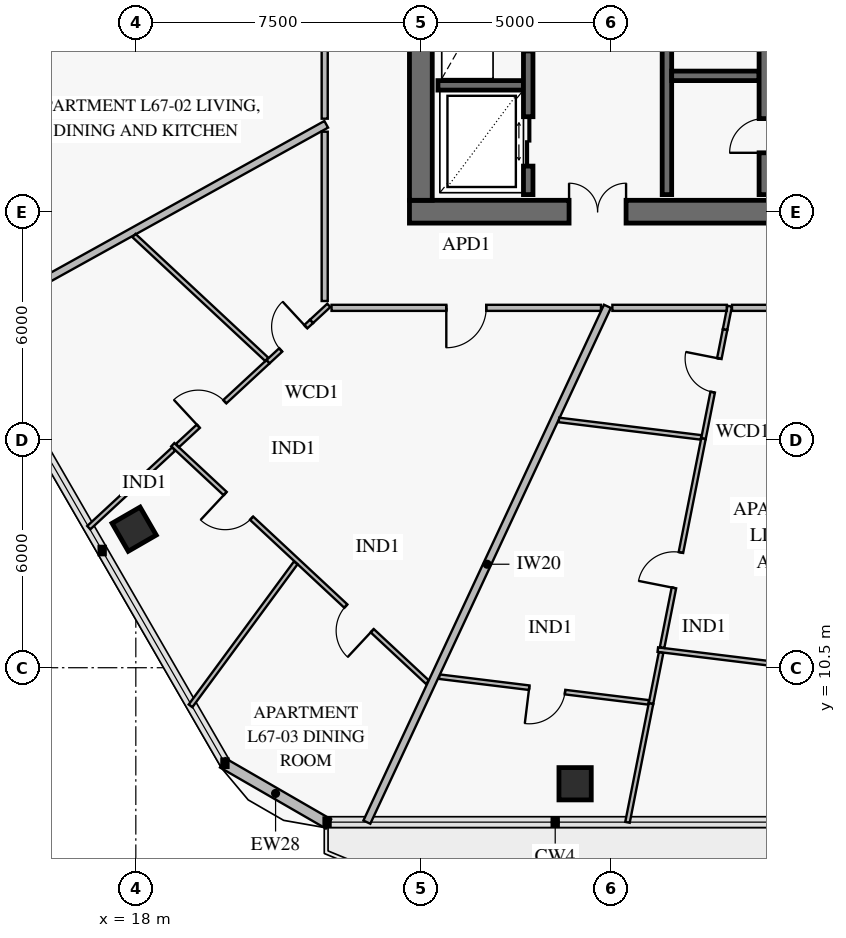
"""IFC4 building model, lengths in metres.
Left out: names, types, materials, properties, quantities, classifications, styles, units other than length and angle.
Written with IfcOpenShell. Run it as: python <this file> out.ifc"""

import sys

from ifc_helpers import new_model, si_unit, direction, frame, frame_2d, origin, origin_2d, place, context, subcontext, project, spatial, rectangle, extrude, element, fill, save


model = new_model("IFC4")
c1 = context("Model", 3, precision=1e-05, world=origin(), true_north=direction((0.0, 1.0)))
c2 = subcontext(c1, "Body", "Model", "MODEL_VIEW")
j1 = project(units=[si_unit("LENGTHUNIT", "METRE"), si_unit("PLANEANGLEUNIT", "RADIAN")], contexts=[c1])
p1 = place(None, origin())
s1 = spatial("IfcSite", under=j1, at=p1, CompositionType="ELEMENT")
p2 = place(p1, origin())
s2 = spatial("IfcBuilding", under=s1, at=p2, CompositionType="ELEMENT")
p3 = place(p2, frame((0.0, 0.0, 265.4)))
s3 = spatial("IfcBuildingStorey", under=s2, at=p3, CompositionType="ELEMENT", Elevation=265.4)
p4 = place(p3, frame((25.2, 22.5, 0.0), z_axis=(0.0, 0.0, 1.0), x_axis=(1.0, 0.0, 0.0)))
e1 = element("IfcWall", 1, at=p4, inside=s3, PredefinedType="SHEAR", context=c2, shape_type="SweptSolid", body=[
    extrude(rectangle(XDim=9.85, YDim=0.6, at=frame_2d((4.925, 0.0))), origin(), (0.0, 0.0, 1.0), 3.8),
])
p5 = place(p4, frame((4.2, 0.0, 0.0)))
e2 = element("IfcOpeningElement", 2, at=p5, cuts=e1, PredefinedType="OPENING", context=c2, shape_type="SweptSolid", body=[
    extrude(rectangle(XDim=1.5, YDim=2.15, at=frame_2d((0.75, 1.075))), frame((0.0, 0.312, 0.0), z_axis=(0.0, -1.0, 0.0), x_axis=(1.0, 0.0, 0.0)), (0.0, 0.0, 1.0), 0.624),
])
p6 = place(p3, frame((25.5, 22.8, 0.0), z_axis=(0.0, 0.0, 1.0), x_axis=(0.0, 1.0, 0.0)))
e3 = element("IfcWall", 3, at=p6, inside=s3, PredefinedType="SHEAR", context=c2, shape_type="SweptSolid", body=[
    extrude(rectangle(XDim=18.4, YDim=0.6, at=frame_2d((9.2, 0.0))), origin(), (0.0, 0.0, 1.0), 3.8),
])
p7 = place(p6, frame((8.95, 0.0, 0.0)))
e4 = element("IfcOpeningElement", 4, at=p7, cuts=e3, PredefinedType="OPENING", context=c2, shape_type="SweptSolid", body=[
    extrude(rectangle(XDim=1.1, YDim=2.15, at=frame_2d((0.55, 1.075))), frame((0.0, 0.312, 0.0), z_axis=(0.0, -1.0, 0.0), x_axis=(1.0, 0.0, 0.0)), (0.0, 0.0, 1.0), 0.624),
])
for number, where, z_axis, x_axis in (
    (5, (17.956, 14.145, 0.0), (0.0, 0.0, 1.0), (0.5, -0.866, 0.0)),
    (6, (29.559, 7.446, 0.0), (0.0, 0.0, 1.0), (1.0, 0.0, 0.0)),
):
    element("IfcColumn", number, at=place(p3, frame(where, z_axis=z_axis, x_axis=x_axis)), inside=s3, PredefinedType="COLUMN", context=c2, shape_type="SweptSolid", body=[
        extrude(rectangle(XDim=0.85, YDim=0.85, at=origin_2d()), origin(), (0.0, 0.0, 1.0), 3.55),
    ])
p8 = place(p3, frame((23.07, 6.389, 0.0), z_axis=(0.0, 0.0, 1.0), x_axis=(-0.866028773314, 0.499994163758, 0.0)))
e7 = element("IfcWall", 7, at=p8, inside=s3, PredefinedType="SOLIDWALL", context=c2, shape_type="SweptSolid", body=[
    extrude(rectangle(XDim=3.215, YDim=0.28, at=frame_2d((1.607, 0.0))), origin(), (0.0, 0.0, 1.0), 3.55),
])
p9 = place(p3, frame((25.95, 25.825, 0.0), z_axis=(0.0, 0.0, 1.0), x_axis=(1.0, 0.0, 0.0)))
e8 = element("IfcWall", 8, at=p9, inside=s3, PredefinedType="SOLIDWALL", context=c2, shape_type="SweptSolid", body=[
    extrude(rectangle(XDim=2.25, YDim=0.25, at=frame_2d((1.125, 0.0))), origin(), (0.0, 0.0, 1.0), 3.8),
])
p10 = place(p3, frame((28.325, 22.95, 0.0), z_axis=(0.0, 0.0, 1.0), x_axis=(0.0, 1.0, 0.0)))
e9 = element("IfcWall", 9, at=p10, inside=s3, PredefinedType="SOLIDWALL", context=c2, shape_type="SweptSolid", body=[
    extrude(rectangle(XDim=8.2, YDim=0.25, at=frame_2d((4.1, 0.0))), origin(), (0.0, 0.0, 1.0), 3.8),
])
p11 = place(p10, frame((0.75, 0.0, 0.0)))
e10 = element("IfcOpeningElement", 10, at=p11, cuts=e9, PredefinedType="OPENING", context=c2, shape_type="SweptSolid", body=[
    extrude(rectangle(XDim=1.3, YDim=2.3, at=frame_2d((0.65, 1.15))), frame((0.0, 0.137, 0.0), z_axis=(0.0, -1.0, 0.0), x_axis=(1.0, 0.0, 0.0)), (0.0, 0.0, 1.0), 0.274),
])
p12 = place(p10, frame((3.78, 0.0, 0.0)))
e11 = element("IfcOpeningElement", 11, at=p12, cuts=e9, PredefinedType="OPENING", context=c2, shape_type="SweptSolid", body=[
    extrude(rectangle(XDim=0.9, YDim=2.1, at=frame_2d((0.45, 1.05))), frame((0.0, 0.137, 0.0), z_axis=(0.0, -1.0, 0.0), x_axis=(1.0, 0.0, 0.0)), (0.0, 0.0, 1.0), 0.274),
])
p13 = place(p10, frame((6.5, 0.0, 0.0)))
e12 = element("IfcOpeningElement", 12, at=p13, cuts=e9, PredefinedType="OPENING", context=c2, shape_type="SweptSolid", body=[
    extrude(rectangle(XDim=0.9, YDim=2.1, at=frame_2d((0.45, 1.05))), frame((0.0, 0.137, 0.0), z_axis=(0.0, -1.0, 0.0), x_axis=(1.0, 0.0, 0.0)), (0.0, 0.0, 1.0), 0.274),
])
p14 = place(p3, frame((31.975, 22.95, 0.0), z_axis=(0.0, 0.0, 1.0), x_axis=(0.0, 1.0, 0.0)))
e13 = element("IfcWall", 13, at=p14, inside=s3, PredefinedType="SOLIDWALL", context=c2, shape_type="SweptSolid", body=[
    extrude(rectangle(XDim=8.2, YDim=0.25, at=frame_2d((4.1, 0.0))), origin(), (0.0, 0.0, 1.0), 3.8),
])
p15 = place(p3, frame((32.1, 26.075, 0.0), z_axis=(0.0, 0.0, 1.0), x_axis=(1.0, 0.0, 0.0)))
e14 = element("IfcWall", 14, at=p15, inside=s3, PredefinedType="SOLIDWALL", context=c2, shape_type="SweptSolid", body=[
    extrude(rectangle(XDim=2.3, YDim=0.25, at=frame_2d((1.15, 0.0))), origin(), (0.0, 0.0, 1.0), 3.8),
])
p16 = place(p3, frame((34.525, 22.95, 0.0), z_axis=(0.0, 0.0, 1.0), x_axis=(0.0, 1.0, 0.0)))
e15 = element("IfcWall", 15, at=p16, inside=s3, PredefinedType="SOLIDWALL", context=c2, shape_type="SweptSolid", body=[
    extrude(rectangle(XDim=8.2, YDim=0.25, at=frame_2d((4.1, 0.0))), origin(), (0.0, 0.0, 1.0), 3.8),
])
p17 = place(p16, frame((1.1, 0.0, 0.0)))
e16 = element("IfcOpeningElement", 16, at=p17, cuts=e15, PredefinedType="OPENING", context=c2, shape_type="SweptSolid", body=[
    extrude(rectangle(XDim=0.9, YDim=2.1, at=frame_2d((0.45, 1.05))), frame((0.0, 0.137, 0.0), z_axis=(0.0, -1.0, 0.0), x_axis=(1.0, 0.0, 0.0)), (0.0, 0.0, 1.0), 0.274),
])
p18 = place(p16, frame((5.2, 0.0, 0.0)))
e17 = element("IfcOpeningElement", 17, at=p18, cuts=e15, PredefinedType="OPENING", context=c2, shape_type="SweptSolid", body=[
    extrude(rectangle(XDim=0.9, YDim=2.1, at=frame_2d((0.45, 1.05))), frame((0.0, 0.137, 0.0), z_axis=(0.0, -1.0, 0.0), x_axis=(1.0, 0.0, 0.0)), (0.0, 0.0, 1.0), 0.274),
])
p19 = place(p3, frame((22.97, 30.426, 0.0), z_axis=(0.0, 0.0, 1.0), x_axis=(0.0, -1.0, 0.0)))
e18 = element("IfcWall", 18, at=p19, inside=s3, PredefinedType="PARTITIONING", context=c2, shape_type="SweptSolid", body=[
    extrude(rectangle(XDim=5.478, YDim=0.16, at=frame_2d((2.739, 0.0))), origin(), (0.0, 0.0, 1.0), 2.95),
])
p20 = place(p19, frame((2.214, 0.0, 0.0)))
e19 = element("IfcOpeningElement", 19, at=p20, cuts=e18, PredefinedType="OPENING", context=c2, shape_type="SweptSolid", body=[
    extrude(rectangle(XDim=1.05, YDim=2.15, at=frame_2d((0.525, 1.075))), frame((0.0, 0.092, 0.0), z_axis=(0.0, -1.0, 0.0), x_axis=(1.0, 0.0, 0.0)), (0.0, 0.0, 1.0), 0.184),
])
p21 = place(p3, frame((18.972, 16.368, 0.0), z_axis=(0.0, 0.0, 1.0), x_axis=(0.731359968951, -0.68199163911, 0.0)))
e20 = element("IfcWall", 20, at=p21, inside=s3, PredefinedType="PARTITIONING", context=c2, shape_type="SweptSolid", body=[
    extrude(rectangle(XDim=9.164, YDim=0.12, at=frame_2d((4.582, 0.0))), origin(), (0.0, 0.0, 1.0), 2.95),
])
p22 = place(p21, frame((1.885, 0.0, 0.0)))
e21 = element("IfcOpeningElement", 21, at=p22, cuts=e20, PredefinedType="OPENING", context=c2, shape_type="SweptSolid", body=[
    extrude(rectangle(XDim=0.95, YDim=2.1, at=frame_2d((0.475, 1.05))), frame((0.0, 0.072, 0.0), z_axis=(0.0, -1.0, 0.0), x_axis=(1.0, 0.0, 0.0)), (0.0, 0.0, 1.0), 0.144),
])
p23 = place(p21, frame((6.227, 0.0, 0.0)))
e22 = element("IfcOpeningElement", 22, at=p23, cuts=e20, PredefinedType="OPENING", context=c2, shape_type="SweptSolid", body=[
    extrude(rectangle(XDim=0.95, YDim=2.1, at=frame_2d((0.475, 1.05))), frame((0.0, 0.072, 0.0), z_axis=(0.0, -1.0, 0.0), x_axis=(1.0, 0.0, 0.0)), (0.0, 0.0, 1.0), 0.144),
])
p24 = place(p3, frame((22.625, 19.615, 0.0), z_axis=(0.0, 0.0, 1.0), x_axis=(-0.733731867306, -0.679439141424, 0.0)))
e23 = element("IfcWall", 23, at=p24, inside=s3, PredefinedType="PARTITIONING", context=c2, shape_type="SweptSolid", body=[
    extrude(rectangle(XDim=1.565, YDim=0.12, at=frame_2d((0.782, 0.0))), origin(), (0.0, 0.0, 1.0), 3.55),
])
p25 = place(p24, frame((0.207, 0.0, 0.0)))
e24 = element("IfcOpeningElement", 24, at=p25, cuts=e23, PredefinedType="OPENING", context=c2, shape_type="SweptSolid", body=[
    extrude(rectangle(XDim=0.9, YDim=2.1, at=frame_2d((0.45, 1.05))), frame((0.0, 0.072, 0.0), z_axis=(0.0, -1.0, 0.0), x_axis=(1.0, 0.0, 0.0)), (0.0, 0.0, 1.0), 0.144),
])
p26 = place(p3, frame((21.477, 18.552, 0.0), z_axis=(0.0, 0.0, 1.0), x_axis=(-0.733668997341, -0.679507028912, 0.0)))
e25 = element("IfcWall", 25, at=p26, inside=s3, PredefinedType="PARTITIONING", context=c2, shape_type="SweptSolid", body=[
    extrude(rectangle(XDim=3.245, YDim=0.12, at=frame_2d((1.623, 0.0))), origin(), (0.0, 0.0, 1.0), 3.15),
])
p27 = place(p26, frame((1.547, 0.0, 0.0)))
e26 = element("IfcOpeningElement", 26, at=p27, cuts=e25, PredefinedType="OPENING", context=c2, shape_type="SweptSolid", body=[
    extrude(rectangle(XDim=0.95, YDim=2.1, at=frame_2d((0.475, 1.05))), frame((0.0, 0.072, 0.0), z_axis=(0.0, -1.0, 0.0), x_axis=(1.0, 0.0, 0.0)), (0.0, 0.0, 1.0), 0.144),
])
p28 = place(p3, frame((18.996, 16.254, 0.0), z_axis=(0.0, 0.0, 1.0), x_axis=(-0.733732538896, -0.679438416168, 0.0)))
e27 = element("IfcWall", 27, at=p28, inside=s3, PredefinedType="PARTITIONING", context=c2, shape_type="SweptSolid", body=[
    extrude(rectangle(XDim=3.044, YDim=0.12, at=frame_2d((1.522, 0.0))), origin(), (0.0, 0.0, 1.0), 2.93),
])
p29 = place(p3, frame((23.15, 19.97, 0.0), z_axis=(0.0, 0.0, 1.0), x_axis=(1.0, 0.0, 0.0)))
e28 = element("IfcWall", 28, at=p29, inside=s3, PredefinedType="PARTITIONING", context=c2, shape_type="SweptSolid", body=[
    extrude(rectangle(XDim=7.09, YDim=0.16, at=frame_2d((3.545, 0.0))), origin(), (0.0, 0.0, 1.0), 2.95),
])
p30 = place(p29, frame((3.02, 0.0, 0.0)))
e29 = element("IfcOpeningElement", 29, at=p30, cuts=e28, PredefinedType="OPENING", context=c2, shape_type="SweptSolid", body=[
    extrude(rectangle(XDim=1.05, YDim=2.15, at=frame_2d((0.525, 1.075))), frame((0.0, 0.092, 0.0), z_axis=(0.0, -1.0, 0.0), x_axis=(1.0, 0.0, 0.0)), (0.0, 0.0, 1.0), 0.184),
])
p31 = place(p3, frame((31.735, 10.976, 0.0), z_axis=(0.0, 0.0, 1.0), x_axis=(0.992544489296, -0.121882881359, 0.0)))
e30 = element("IfcWall", 30, at=p31, inside=s3, PredefinedType="PARTITIONING", context=c2, shape_type="SweptSolid", body=[
    extrude(rectangle(XDim=8.519, YDim=0.12, at=frame_2d((4.26, 0.0))), origin(), (0.0, 0.0, 1.0), 3.55),
])
p32 = place(p31, frame((3.784, 0.0, 0.0)))
e31 = element("IfcOpeningElement", 31, at=p32, cuts=e30, PredefinedType="OPENING", context=c2, shape_type="SweptSolid", body=[
    extrude(rectangle(XDim=0.95, YDim=2.1, at=frame_2d((0.475, 1.05))), frame((0.0, 0.072, 0.0), z_axis=(0.0, -1.0, 0.0), x_axis=(1.0, 0.0, 0.0)), (0.0, 0.0, 1.0), 0.144),
])
p33 = place(p3, frame((33.505, 19.4, 0.0), z_axis=(0.0, 0.0, 1.0), x_axis=(-0.194223379767, -0.980957327692, 0.0)))
e32 = element("IfcWall", 32, at=p33, inside=s3, PredefinedType="PARTITIONING", context=c2, shape_type="SweptSolid", body=[
    extrude(rectangle(XDim=2.927, YDim=0.12, at=frame_2d((1.464, 0.0))), origin(), (0.0, 0.0, 1.0), 3.55),
])
p34 = place(p33, frame((0.78, 0.0, 0.0)))
e33 = element("IfcOpeningElement", 33, at=p34, cuts=e32, PredefinedType="OPENING", context=c2, shape_type="SweptSolid", body=[
    extrude(rectangle(XDim=0.9, YDim=2.1, at=frame_2d((0.45, 1.05))), frame((0.0, 0.072, 0.0), z_axis=(0.0, -1.0, 0.0), x_axis=(1.0, 0.0, 0.0)), (0.0, 0.0, 1.0), 0.144),
])
p35 = place(p3, frame((32.937, 16.528, 0.0), z_axis=(0.0, 0.0, 1.0), x_axis=(-0.194255896186, -0.980950889085, 0.0)))
e34 = element("IfcWall", 34, at=p35, inside=s3, PredefinedType="PARTITIONING", context=c2, shape_type="SweptSolid", body=[
    extrude(rectangle(XDim=5.604, YDim=0.12, at=frame_2d((2.802, 0.0))), origin(), (0.0, 0.0, 1.0), 3.15),
])
p36 = place(p35, frame((3.054, 0.0, 0.0)))
e35 = element("IfcOpeningElement", 35, at=p36, cuts=e34, PredefinedType="OPENING", context=c2, shape_type="SweptSolid", body=[
    extrude(rectangle(XDim=0.95, YDim=2.1, at=frame_2d((0.475, 1.05))), frame((0.0, 0.072, 0.0), z_axis=(0.0, -1.0, 0.0), x_axis=(1.0, 0.0, 0.0)), (0.0, 0.0, 1.0), 0.144),
])
p37 = place(p3, frame((31.822, 10.897, 0.0), z_axis=(0.0, 0.0, 1.0), x_axis=(-0.194227600247, -0.980956492054, 0.0)))
e36 = element("IfcWall", 36, at=p37, inside=s3, PredefinedType="PARTITIONING", context=c2, shape_type="SweptSolid", body=[
    extrude(rectangle(XDim=1.368, YDim=0.12, at=frame_2d((0.684, 0.0))), origin(), (0.0, 0.0, 1.0), 3.55),
])
p38 = place(p3, frame((25.985, 10.265, 0.0), z_axis=(0.0, 0.0, 1.0), x_axis=(0.992542241385, -0.121901185661, 0.0)))
e37 = element("IfcWall", 37, at=p38, inside=s3, PredefinedType="PARTITIONING", context=c2, shape_type="SweptSolid", body=[
    extrude(rectangle(XDim=5.55, YDim=0.12, at=frame_2d((2.775, 0.0))), origin(), (0.0, 0.0, 1.0), 2.95),
])
p39 = place(p38, frame((2.384, 0.0, 0.0)))
e38 = element("IfcOpeningElement", 38, at=p39, cuts=e37, PredefinedType="OPENING", context=c2, shape_type="SweptSolid", body=[
    extrude(rectangle(XDim=0.95, YDim=2.1, at=frame_2d((0.475, 1.05))), frame((0.0, 0.072, 0.0), z_axis=(0.0, -1.0, 0.0), x_axis=(1.0, 0.0, 0.0)), (0.0, 0.0, 1.0), 0.144),
])
p40 = place(p3, frame((23.01, 24.8, 0.0), z_axis=(0.0, 0.0, 1.0), x_axis=(-0.874612572959, -0.484822490426, 0.0)))
e39 = element("IfcWall", 39, at=p40, inside=s3, PredefinedType="PARTITIONING", context=c2, shape_type="SweptSolid", body=[
    extrude(rectangle(XDim=10.715, YDim=0.2, at=frame_2d((5.358, 0.0))), origin(), (0.0, 0.0, 1.0), 2.93),
])
p41 = place(p3, frame((22.208, 13.258, 0.0), z_axis=(0.0, 0.0, 1.0), x_axis=(-0.592681807332, -0.80543669848, 0.0)))
e40 = element("IfcWall", 40, at=p41, inside=s3, PredefinedType="PARTITIONING", context=c2, shape_type="SweptSolid", body=[
    extrude(rectangle(XDim=4.67, YDim=0.12, at=frame_2d((2.335, 0.0))), origin(), (0.0, 0.0, 1.0), 2.93),
])
p42 = place(p3, frame((23.079, 20.035, 0.0), z_axis=(0.0, 0.0, 1.0), x_axis=(-0.733833594252, -0.679329269167, 0.0)))
e41 = element("IfcWall", 41, at=p42, inside=s3, PredefinedType="PARTITIONING", context=c2, shape_type="SweptSolid", body=[
    extrude(rectangle(XDim=0.618, YDim=0.12, at=frame_2d((0.309, 0.0))), origin(), (0.0, 0.0, 1.0), 3.55),
])
p43 = place(p3, frame((17.952, 21.872, 0.0), z_axis=(0.0, 0.0, 1.0), x_axis=(0.731364558904, -0.681986716864, 0.0)))
e42 = element("IfcWall", 42, at=p43, inside=s3, PredefinedType="PARTITIONING", context=c2, shape_type="SweptSolid", body=[
    extrude(rectangle(XDim=4.776, YDim=0.12, at=frame_2d((2.388, 0.0))), origin(), (0.0, 0.0, 1.0), 3.15),
])
p44 = place(p3, frame((30.409, 20.01, 0.0), z_axis=(0.0, 0.0, 1.0), x_axis=(-0.422607909104, -0.906312614479, 0.0)))
e43 = element("IfcWall", 43, at=p44, inside=s3, PredefinedType="PARTITIONING", context=c2, shape_type="SweptSolid", body=[
    extrude(rectangle(XDim=14.977, YDim=0.2, at=frame_2d((7.488, 0.0))), origin(), (0.0, 0.0, 1.0), 2.93),
])
p45 = place(p3, frame((33.627, 20.014, 0.0), z_axis=(0.0, 0.0, 1.0), x_axis=(-0.194092051537, -0.98098332072, 0.0)))
e44 = element("IfcWall", 44, at=p45, inside=s3, PredefinedType="PARTITIONING", context=c2, shape_type="SweptSolid", body=[
    extrude(rectangle(XDim=0.626, YDim=0.12, at=frame_2d((0.313, 0.0))), origin(), (0.0, 0.0, 1.0), 3.55),
])
p46 = place(p3, frame((31.556, 9.555, 0.0), z_axis=(0.0, 0.0, 1.0), x_axis=(-0.19425823532, -0.980950425868, 0.0)))
e45 = element("IfcWall", 45, at=p46, inside=s3, PredefinedType="PARTITIONING", context=c2, shape_type="SweptSolid", body=[
    extrude(rectangle(XDim=3.185, YDim=0.12, at=frame_2d((1.592, 0.0))), origin(), (0.0, 0.0, 1.0), 2.93),
])
p47 = place(p3, frame((29.134, 17.02, 0.0), z_axis=(0.0, 0.0, 1.0), x_axis=(0.992545655443, -0.121873384548, 0.0)))
e46 = element("IfcWall", 46, at=p47, inside=s3, PredefinedType="PARTITIONING", context=c2, shape_type="SweptSolid", body=[
    extrude(rectangle(XDim=3.768, YDim=0.12, at=frame_2d((1.884, 0.0))), origin(), (0.0, 0.0, 1.0), 2.95),
])
p48 = place(p3, frame((22.97, 24.605, 0.0), z_axis=(0.0, 0.0, 1.0), x_axis=(0.0, -1.0, 0.0)))
e47 = element("IfcWall", 47, at=p48, inside=s3, PredefinedType="PARTITIONING", context=c2, shape_type="SweptSolid", body=[
    extrude(rectangle(XDim=4.455, YDim=0.16, at=frame_2d((2.228, 0.0))), origin(), (0.0, 0.0, 1.0), 3.55),
])
p49 = place(p3, frame((33.687, 19.97, 0.0), z_axis=(0.0, 0.0, 1.0), x_axis=(1.0, 0.0, 0.0)))
e48 = element("IfcWall", 48, at=p49, inside=s3, PredefinedType="PARTITIONING", context=c2, shape_type="SweptSolid", body=[
    extrude(rectangle(XDim=0.945, YDim=0.16, at=frame_2d((0.472, 0.0))), origin(), (0.0, 0.0, 1.0), 3.55),
])
p50 = place(p3, frame((30.54, 19.97, 0.0), z_axis=(0.0, 0.0, 1.0), x_axis=(1.0, 0.0, 0.0)))
e49 = element("IfcWall", 49, at=p50, inside=s3, PredefinedType="PARTITIONING", context=c2, shape_type="SweptSolid", body=[
    extrude(rectangle(XDim=3.009, YDim=0.16, at=frame_2d((1.504, 0.0))), origin(), (0.0, 0.0, 1.0), 2.95),
])
p51 = place(p5, origin())
e50 = element("IfcDoor", 50, at=p51, inside=s3, OperationType="DOUBLE_DOOR_SINGLE_SWING", PredefinedType="DOOR", context=c2, shape_type="SweptSolid", body=[
    extrude(rectangle(XDim=1.5, YDim=2.15, at=frame_2d((0.75, 1.075))), frame((0.0, 0.025, 0.0), z_axis=(0.0, -1.0, 0.0), x_axis=(1.0, 0.0, 0.0)), (0.0, 0.0, 1.0), 0.05),
])
fill(e2, e50)
p52 = place(p11, frame((1.3, 0.0, 0.0), z_axis=(0.0, 0.0, 1.0), x_axis=(-1.0, 0.0, 0.0)))
e51 = element("IfcDoor", 51, at=p52, inside=s3, OperationType="DOUBLE_DOOR_SLIDING", PredefinedType="DOOR", context=c2, shape_type="SweptSolid", body=[
    extrude(rectangle(XDim=1.3, YDim=2.3, at=frame_2d((0.65, 1.15))), frame((0.0, 0.025, 0.0), z_axis=(0.0, -1.0, 0.0), x_axis=(1.0, 0.0, 0.0)), (0.0, 0.0, 1.0), 0.05),
])
fill(e10, e51)
p53 = place(p17, origin())
e52 = element("IfcDoor", 52, at=p53, inside=s3, OperationType="SINGLE_SWING_LEFT", PredefinedType="DOOR", context=c2, shape_type="SweptSolid", body=[
    extrude(rectangle(XDim=0.9, YDim=2.1, at=frame_2d((0.45, 1.05))), frame((0.0, 0.025, 0.0), z_axis=(0.0, -1.0, 0.0), x_axis=(1.0, 0.0, 0.0)), (0.0, 0.0, 1.0), 0.05),
])
fill(e16, e52)
p54 = place(p22, frame((0.95, 0.0, 0.0), z_axis=(0.0, 0.0, 1.0), x_axis=(-1.0, 0.0, 0.0)))
e53 = element("IfcDoor", 53, at=p54, inside=s3, OperationType="SINGLE_SWING_RIGHT", PredefinedType="DOOR", context=c2, shape_type="SweptSolid", body=[
    extrude(rectangle(XDim=0.95, YDim=2.1, at=frame_2d((0.475, 1.05))), frame((0.0, 0.025, 0.0), z_axis=(0.0, -1.0, 0.0), x_axis=(1.0, 0.0, 0.0)), (0.0, 0.0, 1.0), 0.05),
])
fill(e21, e53)
p55 = place(p23, frame((0.95, 0.0, 0.0), z_axis=(0.0, 0.0, 1.0), x_axis=(-1.0, 0.0, 0.0)))
e54 = element("IfcDoor", 54, at=p55, inside=s3, OperationType="SINGLE_SWING_LEFT", PredefinedType="DOOR", context=c2, shape_type="SweptSolid", body=[
    extrude(rectangle(XDim=0.95, YDim=2.1, at=frame_2d((0.475, 1.05))), frame((0.0, 0.025, 0.0), z_axis=(0.0, -1.0, 0.0), x_axis=(1.0, 0.0, 0.0)), (0.0, 0.0, 1.0), 0.05),
])
fill(e22, e54)
p56 = place(p25, frame((0.9, 0.0, 0.0), z_axis=(0.0, 0.0, 1.0), x_axis=(-1.0, 0.0, 0.0)))
e55 = element("IfcDoor", 55, at=p56, inside=s3, OperationType="SINGLE_SWING_RIGHT", PredefinedType="DOOR", context=c2, shape_type="SweptSolid", body=[
    extrude(rectangle(XDim=0.9, YDim=2.1, at=frame_2d((0.45, 1.05))), frame((0.0, 0.025, 0.0), z_axis=(0.0, -1.0, 0.0), x_axis=(1.0, 0.0, 0.0)), (0.0, 0.0, 1.0), 0.05),
])
fill(e24, e55)
p57 = place(p27, frame((0.95, 0.0, 0.0), z_axis=(0.0, 0.0, 1.0), x_axis=(-1.0, 0.0, 0.0)))
e56 = element("IfcDoor", 56, at=p57, inside=s3, OperationType="SINGLE_SWING_LEFT", PredefinedType="DOOR", context=c2, shape_type="SweptSolid", body=[
    extrude(rectangle(XDim=0.95, YDim=2.1, at=frame_2d((0.475, 1.05))), frame((0.0, 0.025, 0.0), z_axis=(0.0, -1.0, 0.0), x_axis=(1.0, 0.0, 0.0)), (0.0, 0.0, 1.0), 0.05),
])
fill(e26, e56)
p58 = place(p30, frame((1.05, 0.0, 0.0), z_axis=(0.0, 0.0, 1.0), x_axis=(-1.0, 0.0, 0.0)))
e57 = element("IfcDoor", 57, at=p58, inside=s3, OperationType="SINGLE_SWING_RIGHT", PredefinedType="DOOR", context=c2, shape_type="SweptSolid", body=[
    extrude(rectangle(XDim=1.05, YDim=2.15, at=frame_2d((0.525, 1.075))), frame((0.0, 0.025, 0.0), z_axis=(0.0, -1.0, 0.0), x_axis=(1.0, 0.0, 0.0)), (0.0, 0.0, 1.0), 0.05),
])
fill(e29, e57)
p59 = place(p34, frame((0.9, 0.0, 0.0), z_axis=(0.0, 0.0, 1.0), x_axis=(-1.0, 0.0, 0.0)))
e58 = element("IfcDoor", 58, at=p59, inside=s3, OperationType="SINGLE_SWING_RIGHT", PredefinedType="DOOR", context=c2, shape_type="SweptSolid", body=[
    extrude(rectangle(XDim=0.9, YDim=2.1, at=frame_2d((0.45, 1.05))), frame((0.0, 0.025, 0.0), z_axis=(0.0, -1.0, 0.0), x_axis=(1.0, 0.0, 0.0)), (0.0, 0.0, 1.0), 0.05),
])
fill(e33, e58)
p60 = place(p36, frame((0.95, 0.0, 0.0), z_axis=(0.0, 0.0, 1.0), x_axis=(-1.0, 0.0, 0.0)))
e59 = element("IfcDoor", 59, at=p60, inside=s3, OperationType="SINGLE_SWING_LEFT", PredefinedType="DOOR", context=c2, shape_type="SweptSolid", body=[
    extrude(rectangle(XDim=0.95, YDim=2.1, at=frame_2d((0.475, 1.05))), frame((0.0, 0.025, 0.0), z_axis=(0.0, -1.0, 0.0), x_axis=(1.0, 0.0, 0.0)), (0.0, 0.0, 1.0), 0.05),
])
fill(e35, e59)
p61 = place(p39, frame((0.95, 0.0, 0.0), z_axis=(0.0, 0.0, 1.0), x_axis=(-1.0, 0.0, 0.0)))
e60 = element("IfcDoor", 60, at=p61, inside=s3, OperationType="SINGLE_SWING_RIGHT", PredefinedType="DOOR", context=c2, shape_type="SweptSolid", body=[
    extrude(rectangle(XDim=0.95, YDim=2.1, at=frame_2d((0.475, 1.05))), frame((0.0, 0.025, 0.0), z_axis=(0.0, -1.0, 0.0), x_axis=(1.0, 0.0, 0.0)), (0.0, 0.0, 1.0), 0.05),
])
fill(e38, e60)
save(model, sys.argv[1])
